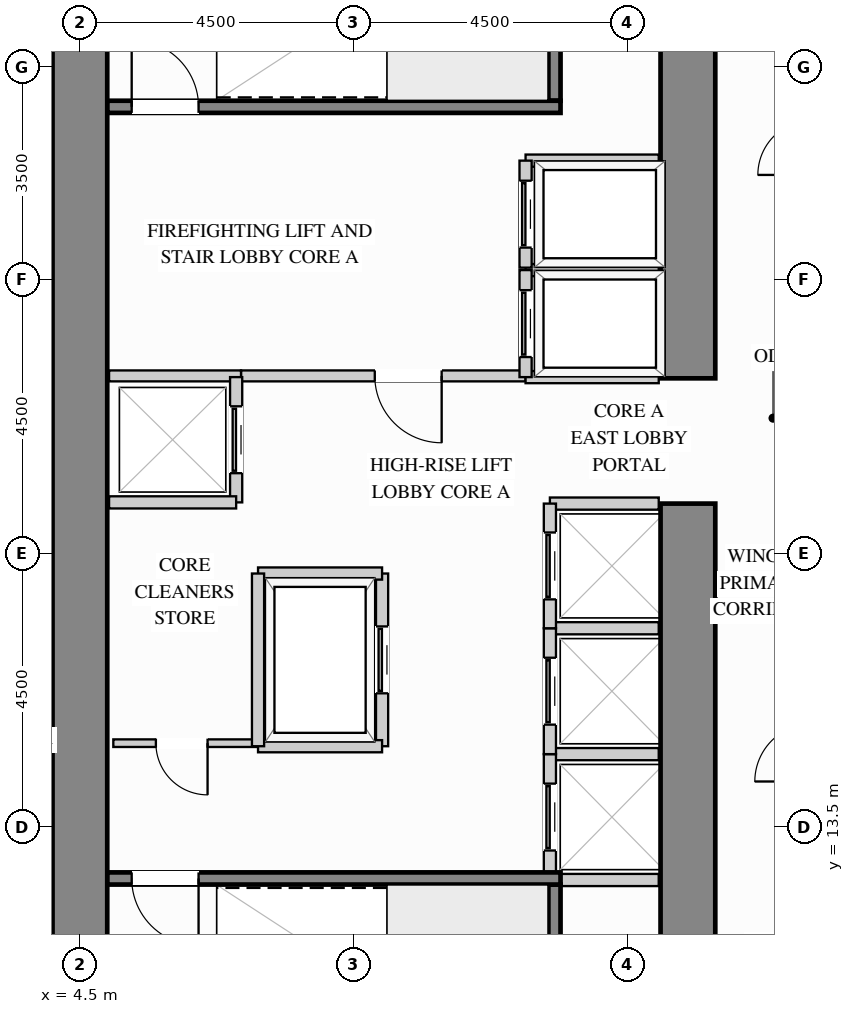
"""IFC4 building model, lengths in metres.
Left out: names, types, materials, properties, quantities, classifications, styles, units other than length and angle.
Written with IfcOpenShell. Run it as: python <this file> out.ifc"""

import sys

from ifc_helpers import new_model, si_unit, direction, frame, frame_2d, origin, place, context, subcontext, project, spatial, rectangle, extrude, source, transform, mapped, element, fill, save


model = new_model("IFC4")
c1 = context("Model", 3, precision=1e-05, world=origin(), true_north=direction((0.0, 1.0)))
c2 = subcontext(c1, "Body", "Model", "MODEL_VIEW")
j1 = project(units=[si_unit("LENGTHUNIT", "METRE"), si_unit("PLANEANGLEUNIT", "RADIAN")], contexts=[c1])
p1 = place(None, origin())
s1 = spatial("IfcSite", under=j1, at=p1, CompositionType="ELEMENT")
p2 = place(p1, origin())
s2 = spatial("IfcBuilding", under=s1, at=p2, CompositionType="ELEMENT")
p3 = place(p2, frame((0.0, 0.0, 36.9)))
s3 = spatial("IfcBuildingStorey", under=s2, at=p3, CompositionType="ELEMENT", Elevation=36.9)
m1 = source(origin(), c2, "Body", "SweptSolid", [
    extrude(rectangle(XDim=9.87, YDim=0.9, at=frame_2d((4.935, 0.0))), origin(), (0.0, 0.0, 1.0), 3.38),
])
p4 = place(p3, frame((14.5, 8.95, 0.0), z_axis=(0.0, 0.0, 1.0), x_axis=(0.0, 1.0, 0.0)))
e1 = element("IfcWall", 1, at=p4, inside=s3, PredefinedType="SHEAR", context=c2, shape_type="MappedRepresentation", body=[
    mapped(m1, transform((0.0, 0.0, 0.0), x_axis=(1.0, 0.0, 0.0), y_axis=(0.0, 1.0, 0.0), z_axis=(0.0, 0.0, 1.0))),
])
m2 = source(origin(), c2, "Body", "SweptSolid", [
    extrude(rectangle(XDim=8.17, YDim=0.9, at=frame_2d((4.085, 0.0))), origin(), (0.0, 0.0, 1.0), 3.38),
])
p5 = place(p3, frame((14.5, 20.88, 0.0), z_axis=(0.0, 0.0, 1.0), x_axis=(0.0, 1.0, 0.0)))
e2 = element("IfcWall", 2, at=p5, inside=s3, PredefinedType="SHEAR", context=c2, shape_type="MappedRepresentation", body=[
    mapped(m2, transform((0.0, 0.0, 0.0), x_axis=(1.0, 0.0, 0.0), y_axis=(0.0, 1.0, 0.0), z_axis=(0.0, 0.0, 1.0))),
])
m3 = source(origin(), c2, "Body", "SweptSolid", [
    extrude(rectangle(XDim=20.1, YDim=0.9, at=frame_2d((10.05, 0.0))), origin(), (0.0, 0.0, 1.0), 3.38),
])
p6 = place(p3, frame((4.5, 8.95, 0.0), z_axis=(0.0, 0.0, 1.0), x_axis=(0.0, 1.0, 0.0)))
e3 = element("IfcWall", 3, at=p6, inside=s3, PredefinedType="SHEAR", context=c2, shape_type="MappedRepresentation", body=[
    mapped(m3, transform((0.0, 0.0, 0.0), x_axis=(1.0, 0.0, 0.0), y_axis=(0.0, 1.0, 0.0), z_axis=(0.0, 0.0, 1.0))),
])
p7 = place(p3, frame((7.15, 20.92, 0.0), z_axis=(0.0, 0.0, 1.0), x_axis=(1.0, 0.0, 0.0)))
e4 = element("IfcWall", 4, at=p7, inside=s3, PredefinedType="PARTITIONING", context=c2, shape_type="SweptSolid", body=[
    extrude(rectangle(XDim=4.68, YDim=0.18, at=frame_2d((2.34, 0.0))), origin(), (0.0, 0.0, 1.0), 3.365),
])
p8 = place(p7, frame((2.2, 0.0, 0.0)))
e5 = element("IfcOpeningElement", 5, at=p8, cuts=e4, PredefinedType="OPENING", context=c2, shape_type="SweptSolid", body=[
    extrude(rectangle(XDim=1.1, YDim=2.15, at=frame_2d((0.55, 1.075))), frame((0.0, 0.1, 0.0), z_axis=(0.0, -1.0, 0.0), x_axis=(1.0, 0.0, 0.0)), (0.0, 0.0, 1.0), 0.2),
])
m4 = source(origin(), c2, "Body", "SweptSolid", [
    extrude(rectangle(XDim=2.17, YDim=0.18, at=frame_2d((1.085, 0.0))), origin(), (0.0, 0.0, 1.0), 3.365),
])
p9 = place(p3, frame((4.98, 20.92, 0.0), z_axis=(0.0, 0.0, 1.0), x_axis=(1.0, 0.0, 0.0)))
e6 = element("IfcWall", 6, at=p9, inside=s3, PredefinedType="PARTITIONING", context=c2, shape_type="MappedRepresentation", body=[
    mapped(m4, transform((0.0, 0.0, 0.0), x_axis=(1.0, 0.0, 0.0), y_axis=(0.0, 1.0, 0.0), z_axis=(0.0, 0.0, 1.0))),
])
p10 = place(p3, frame((5.05, 14.88, 0.0), z_axis=(0.0, 0.0, 1.0), x_axis=(1.0, 0.0, 0.0)))
e7 = element("IfcWall", 7, at=p10, inside=s3, PredefinedType="PARTITIONING", context=c2, shape_type="SweptSolid", body=[
    extrude(rectangle(XDim=2.35, YDim=0.125, at=frame_2d((1.175, 0.0))), origin(), (0.0, 0.0, 1.0), 3.365),
])
p11 = place(p10, frame((0.7, 0.0, 0.0)))
e8 = element("IfcOpeningElement", 8, at=p11, cuts=e7, PredefinedType="OPENING", context=c2, shape_type="SweptSolid", body=[
    extrude(rectangle(XDim=0.85, YDim=2.1, at=frame_2d((0.425, 1.05))), frame((0.0, 0.073, 0.0), z_axis=(0.0, -1.0, 0.0), x_axis=(1.0, 0.0, 0.0)), (0.0, 0.0, 1.0), 0.145),
])
m5 = source(origin(), c2, "Body", "SweptSolid", [
    extrude(rectangle(XDim=2.19, YDim=0.2, at=frame_2d((1.095, 0.0))), origin(), (0.0, 0.0, 1.0), 3.365),
])
for number, where, z_axis, x_axis in (
    (9, (11.83, 22.66, 0.0), (0.0, 0.0, 1.0), (1.0, 0.0, 0.0)),
    (10, (11.83, 20.9, 0.0), (0.0, 0.0, 1.0), (1.0, 0.0, 0.0)),
):
    element("IfcWall", number, at=place(p3, frame(where, z_axis=z_axis, x_axis=x_axis)), inside=s3, PredefinedType="PARTITIONING", context=c2, shape_type="MappedRepresentation", body=[
        mapped(m5, transform((0.0, 0.0, 0.0), x_axis=(1.0, 0.0, 0.0), y_axis=(0.0, 1.0, 0.0), z_axis=(0.0, 0.0, 1.0))),
    ])
p12 = place(p3, frame((11.83, 20.9, 0.0), z_axis=(0.0, 0.0, 1.0), x_axis=(0.0, 1.0, 0.0)))
e11 = element("IfcWall", 11, at=p12, inside=s3, PredefinedType="PARTITIONING", context=c2, shape_type="SweptSolid", body=[
    extrude(rectangle(XDim=1.76, YDim=0.2, at=frame_2d((0.88, 0.0))), origin(), (0.0, 0.0, 1.0), 3.365),
])
p13 = place(p12, frame((0.33, 0.0, 0.0)))
e12 = element("IfcOpeningElement", 12, at=p13, cuts=e11, PredefinedType="OPENING", context=c2, shape_type="SweptSolid", body=[
    extrude(rectangle(XDim=1.1, YDim=2.2, at=frame_2d((0.55, 1.1))), frame((0.0, 0.11, 0.0), z_axis=(0.0, -1.0, 0.0), x_axis=(1.0, 0.0, 0.0)), (0.0, 0.0, 1.0), 0.22),
])
p14 = place(p3, frame((11.83, 24.46, 0.0), z_axis=(0.0, 0.0, 1.0), x_axis=(1.0, 0.0, 0.0)))
e13 = element("IfcWall", 13, at=p14, inside=s3, PredefinedType="PARTITIONING", context=c2, shape_type="MappedRepresentation", body=[
    mapped(m5, transform((0.0, 0.0, 0.0), x_axis=(1.0, 0.0, 0.0), y_axis=(0.0, 1.0, 0.0), z_axis=(0.0, 0.0, 1.0))),
])
p15 = place(p3, frame((11.83, 22.7, 0.0), z_axis=(0.0, 0.0, 1.0), x_axis=(0.0, 1.0, 0.0)))
e14 = element("IfcWall", 14, at=p15, inside=s3, PredefinedType="PARTITIONING", context=c2, shape_type="SweptSolid", body=[
    extrude(rectangle(XDim=1.76, YDim=0.2, at=frame_2d((0.88, 0.0))), origin(), (0.0, 0.0, 1.0), 3.365),
])
p16 = place(p15, frame((0.33, 0.0, 0.0)))
e15 = element("IfcOpeningElement", 15, at=p16, cuts=e14, PredefinedType="OPENING", context=c2, shape_type="SweptSolid", body=[
    extrude(rectangle(XDim=1.1, YDim=2.2, at=frame_2d((0.55, 1.1))), frame((0.0, 0.11, 0.0), z_axis=(0.0, -1.0, 0.0), x_axis=(1.0, 0.0, 0.0)), (0.0, 0.0, 1.0), 0.22),
])
m6 = source(origin(), c2, "Body", "SweptSolid", [
    extrude(rectangle(XDim=1.79, YDim=0.2, at=frame_2d((0.895, 0.0))), origin(), (0.0, 0.0, 1.0), 3.365),
])
for number, where, z_axis, x_axis in (
    (16, (12.23, 14.7, 0.0), (0.0, 0.0, 1.0), (1.0, 0.0, 0.0)),
    (17, (12.23, 12.63, 0.0), (0.0, 0.0, 1.0), (1.0, 0.0, 0.0)),
):
    element("IfcWall", number, at=place(p3, frame(where, z_axis=z_axis, x_axis=x_axis)), inside=s3, PredefinedType="PARTITIONING", context=c2, shape_type="MappedRepresentation", body=[
        mapped(m6, transform((0.0, 0.0, 0.0), x_axis=(1.0, 0.0, 0.0), y_axis=(0.0, 1.0, 0.0), z_axis=(0.0, 0.0, 1.0))),
    ])
p17 = place(p3, frame((12.23, 12.63, 0.0), z_axis=(0.0, 0.0, 1.0), x_axis=(0.0, 1.0, 0.0)))
e18 = element("IfcWall", 18, at=p17, inside=s3, PredefinedType="PARTITIONING", context=c2, shape_type="SweptSolid", body=[
    extrude(rectangle(XDim=2.07, YDim=0.2, at=frame_2d((1.035, 0.0))), origin(), (0.0, 0.0, 1.0), 3.365),
])
p18 = place(p17, frame((0.485, 0.0, 0.0)))
e19 = element("IfcOpeningElement", 19, at=p18, cuts=e18, PredefinedType="OPENING", context=c2, shape_type="SweptSolid", body=[
    extrude(rectangle(XDim=1.1, YDim=2.2, at=frame_2d((0.55, 1.1))), frame((0.0, 0.11, 0.0), z_axis=(0.0, -1.0, 0.0), x_axis=(1.0, 0.0, 0.0)), (0.0, 0.0, 1.0), 0.22),
])
p19 = place(p3, frame((12.23, 16.77, 0.0), z_axis=(0.0, 0.0, 1.0), x_axis=(1.0, 0.0, 0.0)))
e20 = element("IfcWall", 20, at=p19, inside=s3, PredefinedType="PARTITIONING", context=c2, shape_type="MappedRepresentation", body=[
    mapped(m6, transform((0.0, 0.0, 0.0), x_axis=(1.0, 0.0, 0.0), y_axis=(0.0, 1.0, 0.0), z_axis=(0.0, 0.0, 1.0))),
])
p20 = place(p3, frame((12.23, 14.7, 0.0), z_axis=(0.0, 0.0, 1.0), x_axis=(0.0, 1.0, 0.0)))
e21 = element("IfcWall", 21, at=p20, inside=s3, PredefinedType="PARTITIONING", context=c2, shape_type="SweptSolid", body=[
    extrude(rectangle(XDim=2.07, YDim=0.2, at=frame_2d((1.035, 0.0))), origin(), (0.0, 0.0, 1.0), 3.365),
])
p21 = place(p20, frame((0.485, 0.0, 0.0)))
e22 = element("IfcOpeningElement", 22, at=p21, cuts=e21, PredefinedType="OPENING", context=c2, shape_type="SweptSolid", body=[
    extrude(rectangle(XDim=1.1, YDim=2.2, at=frame_2d((0.55, 1.1))), frame((0.0, 0.11, 0.0), z_axis=(0.0, -1.0, 0.0), x_axis=(1.0, 0.0, 0.0)), (0.0, 0.0, 1.0), 0.22),
])
p22 = place(p3, frame((12.23, 18.82, 0.0), z_axis=(0.0, 0.0, 1.0), x_axis=(1.0, 0.0, 0.0)))
e23 = element("IfcWall", 23, at=p22, inside=s3, PredefinedType="PARTITIONING", context=c2, shape_type="MappedRepresentation", body=[
    mapped(m6, transform((0.0, 0.0, 0.0), x_axis=(1.0, 0.0, 0.0), y_axis=(0.0, 1.0, 0.0), z_axis=(0.0, 0.0, 1.0))),
])
p23 = place(p3, frame((12.23, 16.77, 0.0), z_axis=(0.0, 0.0, 1.0), x_axis=(0.0, 1.0, 0.0)))
e24 = element("IfcWall", 24, at=p23, inside=s3, PredefinedType="PARTITIONING", context=c2, shape_type="SweptSolid", body=[
    extrude(rectangle(XDim=2.05, YDim=0.2, at=frame_2d((1.025, 0.0))), origin(), (0.0, 0.0, 1.0), 3.365),
])
p24 = place(p23, frame((0.475, 0.0, 0.0)))
e25 = element("IfcOpeningElement", 25, at=p24, cuts=e24, PredefinedType="OPENING", context=c2, shape_type="SweptSolid", body=[
    extrude(rectangle(XDim=1.1, YDim=2.2, at=frame_2d((0.55, 1.1))), frame((0.0, 0.11, 0.0), z_axis=(0.0, -1.0, 0.0), x_axis=(1.0, 0.0, 0.0)), (0.0, 0.0, 1.0), 0.22),
])
p25 = place(p3, frame((7.07, 18.84, 0.0), z_axis=(0.0, 0.0, 1.0), x_axis=(0.0, 1.0, 0.0)))
e26 = element("IfcWall", 26, at=p25, inside=s3, PredefinedType="PARTITIONING", context=c2, shape_type="SweptSolid", body=[
    extrude(rectangle(XDim=2.06, YDim=0.2, at=frame_2d((1.03, 0.0))), origin(), (0.0, 0.0, 1.0), 3.365),
])
p26 = place(p25, frame((0.48, 0.0, 0.0)))
e27 = element("IfcOpeningElement", 27, at=p26, cuts=e26, PredefinedType="OPENING", context=c2, shape_type="SweptSolid", body=[
    extrude(rectangle(XDim=1.1, YDim=2.2, at=frame_2d((0.55, 1.1))), frame((0.0, 0.11, 0.0), z_axis=(0.0, -1.0, 0.0), x_axis=(1.0, 0.0, 0.0)), (0.0, 0.0, 1.0), 0.22),
])
m7 = source(origin(), c2, "Body", "SweptSolid", [
    extrude(rectangle(XDim=2.09, YDim=0.2, at=frame_2d((1.045, 0.0))), origin(), (0.0, 0.0, 1.0), 3.365),
])
p27 = place(p3, frame((4.98, 18.84, 0.0), z_axis=(0.0, 0.0, 1.0), x_axis=(1.0, 0.0, 0.0)))
e28 = element("IfcWall", 28, at=p27, inside=s3, PredefinedType="PARTITIONING", context=c2, shape_type="MappedRepresentation", body=[
    mapped(m7, transform((0.0, 0.0, 0.0), x_axis=(1.0, 0.0, 0.0), y_axis=(0.0, 1.0, 0.0), z_axis=(0.0, 0.0, 1.0))),
])
p28 = place(p3, frame((9.47, 14.83, 0.0), z_axis=(0.0, 0.0, 1.0), x_axis=(0.0, 1.0, 0.0)))
e29 = element("IfcWall", 29, at=p28, inside=s3, PredefinedType="PARTITIONING", context=c2, shape_type="SweptSolid", body=[
    extrude(rectangle(XDim=2.84, YDim=0.2, at=frame_2d((1.42, 0.0))), origin(), (0.0, 0.0, 1.0), 3.365),
])
p29 = place(p28, frame((0.87, 0.0, 0.0)))
e30 = element("IfcOpeningElement", 30, at=p29, cuts=e29, PredefinedType="OPENING", context=c2, shape_type="SweptSolid", body=[
    extrude(rectangle(XDim=1.1, YDim=2.2, at=frame_2d((0.55, 1.1))), frame((0.0, 0.11, 0.0), z_axis=(0.0, -1.0, 0.0), x_axis=(1.0, 0.0, 0.0)), (0.0, 0.0, 1.0), 0.22),
])
m8 = source(origin(), c2, "Body", "SweptSolid", [
    extrude(rectangle(XDim=2.04, YDim=0.2, at=frame_2d((1.02, 0.0))), origin(), (0.0, 0.0, 1.0), 3.365),
])
for number, where, z_axis, x_axis in (
    (31, (7.43, 17.67, 0.0), (0.0, 0.0, 1.0), (1.0, 0.0, 0.0)),
    (32, (7.43, 14.83, 0.0), (0.0, 0.0, 1.0), (1.0, 0.0, 0.0)),
):
    element("IfcWall", number, at=place(p3, frame(where, z_axis=z_axis, x_axis=x_axis)), inside=s3, PredefinedType="PARTITIONING", context=c2, shape_type="MappedRepresentation", body=[
        mapped(m8, transform((0.0, 0.0, 0.0), x_axis=(1.0, 0.0, 0.0), y_axis=(0.0, 1.0, 0.0), z_axis=(0.0, 0.0, 1.0))),
    ])
m9 = source(origin(), c2, "Body", "SweptSolid", [
    extrude(rectangle(XDim=2.84, YDim=0.2, at=frame_2d((1.42, 0.0))), origin(), (0.0, 0.0, 1.0), 3.365),
])
p30 = place(p3, frame((7.43, 14.83, 0.0), z_axis=(0.0, 0.0, 1.0), x_axis=(0.0, 1.0, 0.0)))
e33 = element("IfcWall", 33, at=p30, inside=s3, PredefinedType="PARTITIONING", context=c2, shape_type="MappedRepresentation", body=[
    mapped(m9, transform((0.0, 0.0, 0.0), x_axis=(1.0, 0.0, 0.0), y_axis=(0.0, 1.0, 0.0), z_axis=(0.0, 0.0, 1.0))),
])
m10 = source(origin(), c2, "Body", "SweptSolid", [
    extrude(rectangle(XDim=3.603, YDim=0.2, at=frame_2d((1.802, 0.0))), origin(), (0.0, 0.0, 1.0), 3.38),
])
p31 = place(p3, frame((12.305, 8.952, 0.0), z_axis=(0.0, 0.0, 1.0), x_axis=(0.0, 1.0, 0.0)))
e34 = element("IfcWall", 34, at=p31, inside=s3, PredefinedType="SHEAR", context=c2, shape_type="MappedRepresentation", body=[
    mapped(m10, transform((0.0, 0.0, 0.0), x_axis=(1.0, 0.0, 0.0), y_axis=(0.0, 1.0, 0.0), z_axis=(0.0, 0.0, 1.0))),
])
p32 = place(p3, frame((4.952, 12.655, 0.0), z_axis=(0.0, 0.0, 1.0), x_axis=(1.0, 0.0, 0.0)))
e35 = element("IfcWall", 35, at=p32, inside=s3, PredefinedType="SHEAR", context=c2, shape_type="SweptSolid", body=[
    extrude(rectangle(XDim=7.453, YDim=0.2, at=frame_2d((3.727, 0.0))), origin(), (0.0, 0.0, 1.0), 3.38),
])
p33 = place(p32, frame((0.4, 0.0, 0.0)))
e36 = element("IfcOpeningElement", 36, at=p33, cuts=e35, PredefinedType="OPENING", context=c2, shape_type="SweptSolid", body=[
    extrude(rectangle(XDim=1.1, YDim=2.15, at=frame_2d((0.55, 1.075))), frame((0.0, 0.11, 0.0), z_axis=(0.0, -1.0, 0.0), x_axis=(1.0, 0.0, 0.0)), (0.0, 0.0, 1.0), 0.22),
])
p34 = place(p3, frame((12.305, 25.445, 0.0), z_axis=(0.0, 0.0, 1.0), x_axis=(0.0, 1.0, 0.0)))
e37 = element("IfcWall", 37, at=p34, inside=s3, PredefinedType="SHEAR", context=c2, shape_type="MappedRepresentation", body=[
    mapped(m10, transform((0.0, 0.0, 0.0), x_axis=(1.0, 0.0, 0.0), y_axis=(0.0, 1.0, 0.0), z_axis=(0.0, 0.0, 1.0))),
])
p35 = place(p3, frame((4.952, 25.345, 0.0), z_axis=(0.0, 0.0, 1.0), x_axis=(1.0, 0.0, 0.0)))
e38 = element("IfcWall", 38, at=p35, inside=s3, PredefinedType="SHEAR", context=c2, shape_type="SweptSolid", body=[
    extrude(rectangle(XDim=7.453, YDim=0.2, at=frame_2d((3.727, 0.0))), origin(), (0.0, 0.0, 1.0), 3.38),
])
p36 = place(p35, frame((0.4, 0.0, 0.0)))
e39 = element("IfcOpeningElement", 39, at=p36, cuts=e38, PredefinedType="OPENING", context=c2, shape_type="SweptSolid", body=[
    extrude(rectangle(XDim=1.1, YDim=2.15, at=frame_2d((0.55, 1.075))), frame((0.0, 0.11, 0.0), z_axis=(0.0, -1.0, 0.0), x_axis=(1.0, 0.0, 0.0)), (0.0, 0.0, 1.0), 0.22),
])
m11 = source(origin(), c2, "Body", "SweptSolid", [
    extrude(rectangle(XDim=1.1, YDim=2.15, at=frame_2d((0.55, 1.075))), frame((0.0, 0.025, 0.0), z_axis=(0.0, -1.0, 0.0), x_axis=(1.0, 0.0, 0.0)), (0.0, 0.0, 1.0), 0.05),
])
p37 = place(p8, origin())
e40 = element("IfcDoor", 40, at=p37, inside=s3, OperationType="SINGLE_SWING_RIGHT", PredefinedType="DOOR", context=c2, shape_type="MappedRepresentation", body=[
    mapped(m11, transform((0.0, 0.0, 0.0), x_axis=(1.0, 0.0, 0.0), y_axis=(0.0, 1.0, 0.0), z_axis=(0.0, 0.0, 1.0))),
])
fill(e5, e40)
m12 = source(origin(), c2, "Body", "SweptSolid", [
    extrude(rectangle(XDim=1.1, YDim=2.2, at=frame_2d((0.55, 1.1))), frame((0.0, 0.025, 0.0), z_axis=(0.0, -1.0, 0.0), x_axis=(1.0, 0.0, 0.0)), (0.0, 0.0, 1.0), 0.05),
])
p38 = place(p13, origin())
e41 = element("IfcDoor", 41, at=p38, inside=s3, OperationType="SLIDING_TO_LEFT", PredefinedType="DOOR", context=c2, shape_type="MappedRepresentation", body=[
    mapped(m12, transform((0.0, 0.0, 0.0), x_axis=(1.0, 0.0, 0.0), y_axis=(0.0, 1.0, 0.0), z_axis=(0.0, 0.0, 1.0))),
])
fill(e12, e41)
p39 = place(p16, origin())
e42 = element("IfcDoor", 42, at=p39, inside=s3, OperationType="SLIDING_TO_LEFT", PredefinedType="DOOR", context=c2, shape_type="MappedRepresentation", body=[
    mapped(m12, transform((0.0, 0.0, 0.0), x_axis=(1.0, 0.0, 0.0), y_axis=(0.0, 1.0, 0.0), z_axis=(0.0, 0.0, 1.0))),
])
fill(e15, e42)
p40 = place(p18, origin())
e43 = element("IfcDoor", 43, at=p40, inside=s3, OperationType="SLIDING_TO_LEFT", PredefinedType="DOOR", context=c2, shape_type="MappedRepresentation", body=[
    mapped(m12, transform((0.0, 0.0, 0.0), x_axis=(1.0, 0.0, 0.0), y_axis=(0.0, 1.0, 0.0), z_axis=(0.0, 0.0, 1.0))),
])
fill(e19, e43)
p41 = place(p21, origin())
e44 = element("IfcDoor", 44, at=p41, inside=s3, OperationType="SLIDING_TO_LEFT", PredefinedType="DOOR", context=c2, shape_type="MappedRepresentation", body=[
    mapped(m12, transform((0.0, 0.0, 0.0), x_axis=(1.0, 0.0, 0.0), y_axis=(0.0, 1.0, 0.0), z_axis=(0.0, 0.0, 1.0))),
])
fill(e22, e44)
p42 = place(p24, origin())
e45 = element("IfcDoor", 45, at=p42, inside=s3, OperationType="SLIDING_TO_LEFT", PredefinedType="DOOR", context=c2, shape_type="MappedRepresentation", body=[
    mapped(m12, transform((0.0, 0.0, 0.0), x_axis=(1.0, 0.0, 0.0), y_axis=(0.0, 1.0, 0.0), z_axis=(0.0, 0.0, 1.0))),
])
fill(e25, e45)
p43 = place(p26, origin())
e46 = element("IfcDoor", 46, at=p43, inside=s3, OperationType="SLIDING_TO_LEFT", PredefinedType="DOOR", context=c2, shape_type="MappedRepresentation", body=[
    mapped(m12, transform((0.0, 0.0, 0.0), x_axis=(1.0, 0.0, 0.0), y_axis=(0.0, 1.0, 0.0), z_axis=(0.0, 0.0, 1.0))),
])
fill(e27, e46)
p44 = place(p29, origin())
e47 = element("IfcDoor", 47, at=p44, inside=s3, OperationType="SLIDING_TO_LEFT", PredefinedType="DOOR", context=c2, shape_type="MappedRepresentation", body=[
    mapped(m12, transform((0.0, 0.0, 0.0), x_axis=(1.0, 0.0, 0.0), y_axis=(0.0, 1.0, 0.0), z_axis=(0.0, 0.0, 1.0))),
])
fill(e30, e47)
m13 = source(origin(), c2, "Body", "SweptSolid", [
    extrude(rectangle(XDim=0.85, YDim=2.1, at=frame_2d((0.425, 1.05))), frame((0.0, 0.025, 0.0), z_axis=(0.0, -1.0, 0.0), x_axis=(1.0, 0.0, 0.0)), (0.0, 0.0, 1.0), 0.05),
])
p45 = place(p11, origin())
e48 = element("IfcDoor", 48, at=p45, inside=s3, OperationType="SINGLE_SWING_RIGHT", PredefinedType="DOOR", context=c2, shape_type="MappedRepresentation", body=[
    mapped(m13, transform((0.0, 0.0, 0.0), x_axis=(1.0, 0.0, 0.0), y_axis=(0.0, 1.0, 0.0), z_axis=(0.0, 0.0, 1.0))),
])
fill(e8, e48)
m14 = source(origin(), c2, "Body", "SweptSolid", [
    extrude(rectangle(XDim=1.1, YDim=2.15, at=frame_2d((0.55, 1.075))), frame((0.0, 0.025, 0.0), z_axis=(0.0, -1.0, 0.0), x_axis=(1.0, 0.0, 0.0)), (0.0, 0.0, 1.0), 0.05),
])
p46 = place(p33, origin())
e49 = element("IfcDoor", 49, at=p46, inside=s3, OperationType="SINGLE_SWING_RIGHT", PredefinedType="DOOR", context=c2, shape_type="MappedRepresentation", body=[
    mapped(m14, transform((0.0, 0.0, 0.0), x_axis=(1.0, 0.0, 0.0), y_axis=(0.0, 1.0, 0.0), z_axis=(0.0, 0.0, 1.0))),
])
fill(e36, e49)
p47 = place(p36, origin())
e50 = element("IfcDoor", 50, at=p47, inside=s3, OperationType="SINGLE_SWING_LEFT", PredefinedType="DOOR", context=c2, shape_type="MappedRepresentation", body=[
    mapped(m14, transform((0.0, 0.0, 0.0), x_axis=(1.0, 0.0, 0.0), y_axis=(0.0, 1.0, 0.0), z_axis=(0.0, 0.0, 1.0))),
])
fill(e39, e50)
save(model, sys.argv[1])
